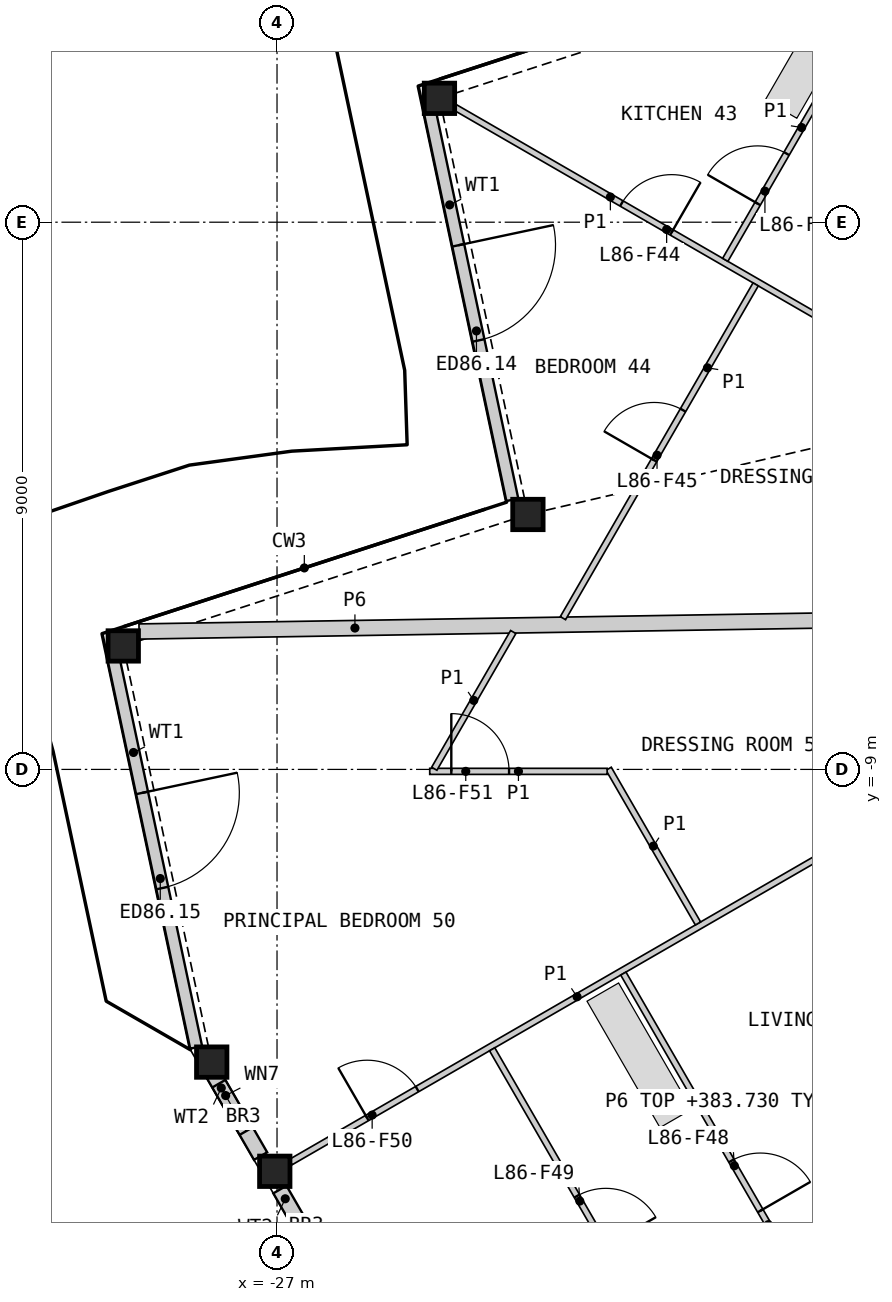
"""IFC4 building model, lengths in metres.
Left out: names, types, materials, properties, quantities, classifications, styles, units other than length and angle.
Written with IfcOpenShell. Run it as: python <this file> out.ifc"""

import sys

from ifc_helpers import new_model, si_unit, direction, frame, frame_2d, origin, origin_2d, place, context, subcontext, project, spatial, rectangle, hollow_rectangle, extrude, element, fill, save


model = new_model("IFC4")
c1 = context("Model", 3, precision=1e-05, world=origin(), true_north=direction((0.0, 1.0)))
c2 = subcontext(c1, "Body", "Model", "MODEL_VIEW")
j1 = project(units=[si_unit("LENGTHUNIT", "METRE"), si_unit("PLANEANGLEUNIT", "RADIAN")], contexts=[c1])
p1 = place(None, origin())
s1 = spatial("IfcSite", under=j1, at=p1, CompositionType="ELEMENT")
p2 = place(p1, origin())
s2 = spatial("IfcBuilding", under=s1, at=p2, CompositionType="ELEMENT")
p3 = place(p2, frame((0.0, 0.0, 381.4)))
s3 = spatial("IfcBuildingStorey", under=s2, at=p3, CompositionType="ELEMENT", Elevation=381.4)
for number, where, z_axis, x_axis in (
    (1, (-24.329, 2.037, 0.0), (0.0, 0.0, 1.0), (1.0, 0.0, 0.0)),
    (2, (-22.874, -4.807, 0.0), (0.0, 0.0, 1.0), (1.0, 0.0, 0.0)),
    (3, (-29.529, -6.969, 0.0), (0.0, 0.0, 1.0), (1.0, 0.0, 0.0)),
    (4, (-28.074, -13.814, 0.0), (0.0, 0.0, 1.0), (1.0, 0.0, 0.0)),
    (5, (-27.037, -15.61, 0.0), (0.0, 0.0, 1.0), (1.0, 0.0, 0.0)),
):
    element("IfcColumn", number, at=place(p3, frame(where, z_axis=z_axis, x_axis=x_axis)), inside=s3, PredefinedType="COLUMN", context=c2, shape_type="SweptSolid", body=[
        extrude(hollow_rectangle(XDim=0.5, YDim=0.5, WallThickness=0.03, at=origin_2d()), origin(), (0.0, 0.0, 1.0), 3.4),
    ])
p4 = place(p3, frame((-24.505, 1.902, 0.0), z_axis=(0.0, 0.0, 1.0), x_axis=(0.207917488951, -0.978146368285, 0.0)))
e6 = element("IfcWall", 6, at=p4, inside=s3, PredefinedType="SOLIDWALL", context=c2, shape_type="SweptSolid", body=[
    extrude(rectangle(XDim=6.612, YDim=0.2, at=frame_2d((3.306, 0.0))), origin(), (0.0, 0.0, 1.0), 2.634),
])
p5 = place(p4, frame((2.333, 0.0, 0.0)))
e7 = element("IfcOpeningElement", 7, at=p5, cuts=e6, PredefinedType="OPENING", context=c2, shape_type="SweptSolid", body=[
    extrude(rectangle(XDim=1.6, YDim=2.25, at=frame_2d((0.8, 1.125))), frame((0.0, 0.11, 0.0), z_axis=(0.0, -1.0, 0.0), x_axis=(1.0, 0.0, 0.0)), (0.0, 0.0, 1.0), 0.22),
])
p6 = place(p3, frame((-29.705, -7.105, 0.0), z_axis=(0.0, 0.0, 1.0), x_axis=(0.207924998532, -0.978144771997, 0.0)))
e8 = element("IfcWall", 8, at=p6, inside=s3, PredefinedType="SOLIDWALL", context=c2, shape_type="SweptSolid", body=[
    extrude(rectangle(XDim=6.612, YDim=0.2, at=frame_2d((3.306, 0.0))), origin(), (0.0, 0.0, 1.0), 2.634),
])
p7 = place(p6, frame((2.333, 0.0, 0.0)))
e9 = element("IfcOpeningElement", 9, at=p7, cuts=e8, PredefinedType="OPENING", context=c2, shape_type="SweptSolid", body=[
    extrude(rectangle(XDim=1.6, YDim=2.25, at=frame_2d((0.8, 1.125))), frame((0.0, 0.11, 0.0), z_axis=(0.0, -1.0, 0.0), x_axis=(1.0, 0.0, 0.0)), (0.0, 0.0, 1.0), 0.22),
])
p8 = place(p3, frame((-28.132, -13.866, 0.0), z_axis=(0.0, 0.0, 1.0), x_axis=(0.499975693202, -0.866039436866, 0.0)))
e10 = element("IfcWall", 10, at=p8, inside=s3, PredefinedType="SOLIDWALL", context=c2, shape_type="SweptSolid", body=[
    extrude(rectangle(XDim=1.725, YDim=0.25, at=frame_2d((0.862, 0.0))), origin(), (0.0, 0.0, 1.0), 2.634),
])
p9 = place(p8, frame((0.35, 0.0, 1.8)))
e11 = element("IfcOpeningElement", 11, at=p9, cuts=e10, PredefinedType="OPENING", context=c2, shape_type="SweptSolid", body=[
    extrude(rectangle(XDim=0.9, YDim=0.6, at=frame_2d((0.45, 0.3))), frame((0.0, 0.135, 0.0), z_axis=(0.0, -1.0, 0.0), x_axis=(1.0, 0.0, 0.0)), (0.0, 0.0, 1.0), 0.27),
])
p10 = place(p3, frame((-26.953, -15.91, 0.0), z_axis=(0.0, 0.0, 1.0), x_axis=(0.500027377864, -0.86600959659, 0.0)))
e12 = element("IfcWall", 12, at=p10, inside=s3, PredefinedType="SOLIDWALL", context=c2, shape_type="SweptSolid", body=[
    extrude(rectangle(XDim=1.756, YDim=0.25, at=frame_2d((0.878, 0.0))), origin(), (0.0, 0.0, 1.0), 2.634),
])
p11 = place(p3, frame((-20.338, -21.771, 0.0), z_axis=(0.0, 0.0, 1.0), x_axis=(0.513878217441, 0.857863146218, 0.0)))
e13 = element("IfcWall", 13, at=p11, inside=s3, PredefinedType="PARTITIONING", context=c2, shape_type="SweptSolid", body=[
    extrude(rectangle(XDim=13.956, YDim=0.25, at=frame_2d((6.978, 0.0))), origin(), (0.0, 0.0, 1.0), 2.33),
])
p12 = place(p3, frame((-29.269, -6.732, 0.0), z_axis=(0.0, 0.0, 1.0), x_axis=(0.999870533117, 0.016090898164, 0.0)))
e14 = element("IfcWall", 14, at=p12, inside=s3, PredefinedType="PARTITIONING", context=c2, shape_type="SweptSolid", body=[
    extrude(rectangle(XDim=14.202, YDim=0.25, at=frame_2d((7.101, 0.0))), origin(), (0.0, 0.0, 1.0), 2.33),
])
p13 = place(p3, frame((-24.069, 1.887, 0.0), z_axis=(0.0, 0.0, 1.0), x_axis=(0.866023404247, -0.500003463284, 0.0)))
e15 = element("IfcWall", 15, at=p13, inside=s3, PredefinedType="PARTITIONING", context=c2, shape_type="SweptSolid", body=[
    extrude(rectangle(XDim=11.782, YDim=0.1, at=frame_2d((5.891, 0.0))), origin(), (0.0, 0.0, 1.0), 2.33),
])
p14 = place(p13, frame((3.159, 0.0, 0.0)))
e16 = element("IfcOpeningElement", 16, at=p14, cuts=e15, PredefinedType="OPENING", context=c2, shape_type="SweptSolid", body=[
    extrude(rectangle(XDim=0.95, YDim=2.1, at=frame_2d((0.475, 1.05))), frame((0.0, 0.06, 0.0), z_axis=(0.0, -1.0, 0.0), x_axis=(1.0, 0.0, 0.0)), (0.0, 0.0, 1.0), 0.12),
])
p15 = place(p3, frame((-26.777, -15.46, 0.0), z_axis=(0.0, 0.0, 1.0), x_axis=(0.866019680922, 0.500009912158, 0.0)))
e17 = element("IfcWall", 17, at=p15, inside=s3, PredefinedType="PARTITIONING", context=c2, shape_type="SweptSolid", body=[
    extrude(rectangle(XDim=10.881, YDim=0.1, at=frame_2d((5.44, 0.0))), origin(), (0.0, 0.0, 1.0), 2.33),
])
p16 = place(p15, frame((1.454, 0.0, 0.0)))
e18 = element("IfcOpeningElement", 18, at=p16, cuts=e17, PredefinedType="OPENING", context=c2, shape_type="SweptSolid", body=[
    extrude(rectangle(XDim=0.95, YDim=2.1, at=frame_2d((0.475, 1.05))), frame((0.0, 0.06, 0.0), z_axis=(0.0, -1.0, 0.0), x_axis=(1.0, 0.0, 0.0)), (0.0, 0.0, 1.0), 0.12),
])
p17 = place(p3, frame((-23.462, -13.603, 0.0), z_axis=(0.0, 0.0, 1.0), x_axis=(0.499998111909, -0.866026493871, 0.0)))
e19 = element("IfcWall", 19, at=p17, inside=s3, PredefinedType="PARTITIONING", context=c2, shape_type="SweptSolid", body=[
    extrude(rectangle(XDim=7.743, YDim=0.1, at=frame_2d((3.872, 0.0))), origin(), (0.0, 0.0, 1.0), 2.33),
])
p18 = place(p17, frame((2.788, 0.0, 0.0)))
e20 = element("IfcOpeningElement", 20, at=p18, cuts=e19, PredefinedType="OPENING", context=c2, shape_type="SweptSolid", body=[
    extrude(rectangle(XDim=0.95, YDim=2.1, at=frame_2d((0.475, 1.05))), frame((0.0, 0.06, 0.0), z_axis=(0.0, -1.0, 0.0), x_axis=(1.0, 0.0, 0.0)), (0.0, 0.0, 1.0), 0.12),
])
p19 = place(p3, frame((-21.304, -12.358, 0.0), z_axis=(0.0, 0.0, 1.0), x_axis=(0.500000558108, -0.866025081561, 0.0)))
e21 = element("IfcWall", 21, at=p19, inside=s3, PredefinedType="PARTITIONING", context=c2, shape_type="SweptSolid", body=[
    extrude(rectangle(XDim=6.358, YDim=0.1, at=frame_2d((3.179, 0.0))), origin(), (0.0, 0.0, 1.0), 2.33),
])
p20 = place(p19, frame((3.555, 0.0, 0.0)))
e22 = element("IfcOpeningElement", 22, at=p20, cuts=e21, PredefinedType="OPENING", context=c2, shape_type="SweptSolid", body=[
    extrude(rectangle(XDim=0.95, YDim=2.1, at=frame_2d((0.475, 1.05))), frame((0.0, 0.06, 0.0), z_axis=(0.0, -1.0, 0.0), x_axis=(1.0, 0.0, 0.0)), (0.0, 0.0, 1.0), 0.12),
])
p21 = place(p3, frame((-22.298, -6.512, 0.0), z_axis=(0.0, 0.0, 1.0), x_axis=(0.499991387631, 0.866030376081, 0.0)))
e23 = element("IfcWall", 23, at=p21, inside=s3, PredefinedType="PARTITIONING", context=c2, shape_type="SweptSolid", body=[
    extrude(rectangle(XDim=6.339, YDim=0.1, at=frame_2d((3.169, 0.0))), origin(), (0.0, 0.0, 1.0), 2.33),
])
p22 = place(p21, frame((3.0, 0.0, 0.0)))
e24 = element("IfcOpeningElement", 24, at=p22, cuts=e23, PredefinedType="OPENING", context=c2, shape_type="SweptSolid", body=[
    extrude(rectangle(XDim=0.95, YDim=2.1, at=frame_2d((0.475, 1.05))), frame((0.0, 0.06, 0.0), z_axis=(0.0, -1.0, 0.0), x_axis=(1.0, 0.0, 0.0)), (0.0, 0.0, 1.0), 0.12),
])
p23 = place(p3, frame((-19.628, -0.619, 0.0), z_axis=(0.0, 0.0, 1.0), x_axis=(0.499990214365, 0.86603105345, 0.0)))
e25 = element("IfcWall", 25, at=p23, inside=s3, PredefinedType="PARTITIONING", context=c2, shape_type="SweptSolid", body=[
    extrude(rectangle(XDim=5.025, YDim=0.1, at=frame_2d((2.512, 0.0))), origin(), (0.0, 0.0, 1.0), 2.33),
])
p24 = place(p23, frame((1.067, 0.0, 0.0)))
e26 = element("IfcOpeningElement", 26, at=p24, cuts=e25, PredefinedType="OPENING", context=c2, shape_type="SweptSolid", body=[
    extrude(rectangle(XDim=0.95, YDim=2.1, at=frame_2d((0.475, 1.05))), frame((0.0, 0.06, 0.0), z_axis=(0.0, -1.0, 0.0), x_axis=(1.0, 0.0, 0.0)), (0.0, 0.0, 1.0), 0.12),
])
p25 = place(p3, frame((-21.546, -8.989, 0.0), z_axis=(0.0, 0.0, 1.0), x_axis=(0.499919039967, -0.866072141036, 0.0)))
e27 = element("IfcWall", 27, at=p25, inside=s3, PredefinedType="PARTITIONING", context=c2, shape_type="SweptSolid", body=[
    extrude(rectangle(XDim=2.938, YDim=0.1, at=frame_2d((1.469, 0.0))), origin(), (0.0, 0.0, 1.0), 2.33),
])
p26 = place(p3, frame((-24.489, -9.032, 0.0), z_axis=(0.0, 0.0, 1.0), x_axis=(1.0, 0.0, 0.0)))
e28 = element("IfcWall", 28, at=p26, inside=s3, PredefinedType="PARTITIONING", context=c2, shape_type="SweptSolid", body=[
    extrude(rectangle(XDim=2.917, YDim=0.1, at=frame_2d((1.459, 0.0))), origin(), (0.0, 0.0, 1.0), 2.33),
])
p27 = place(p26, frame((0.355, 0.0, 0.0)))
e29 = element("IfcOpeningElement", 29, at=p27, cuts=e28, PredefinedType="OPENING", context=c2, shape_type="SweptSolid", body=[
    extrude(rectangle(XDim=0.95, YDim=2.1, at=frame_2d((0.475, 1.05))), frame((0.0, 0.06, 0.0), z_axis=(0.0, -1.0, 0.0), x_axis=(1.0, 0.0, 0.0)), (0.0, 0.0, 1.0), 0.12),
])
p28 = place(p3, frame((-24.414, -8.989, 0.0), z_axis=(0.0, 0.0, 1.0), x_axis=(0.500042595688, 0.866000809756, 0.0)))
e30 = element("IfcWall", 30, at=p28, inside=s3, PredefinedType="PARTITIONING", context=c2, shape_type="SweptSolid", body=[
    extrude(rectangle(XDim=2.596, YDim=0.1, at=frame_2d((1.298, 0.0))), origin(), (0.0, 0.0, 1.0), 2.33),
])
p29 = place(p5, origin())
e31 = element("IfcDoor", 31, at=p29, inside=s3, OperationType="DOUBLE_DOOR_SINGLE_SWING", PredefinedType="DOOR", context=c2, shape_type="SweptSolid", body=[
    extrude(rectangle(XDim=1.6, YDim=2.25, at=frame_2d((0.8, 1.125))), frame((0.0, 0.025, 0.0), z_axis=(0.0, -1.0, 0.0), x_axis=(1.0, 0.0, 0.0)), (0.0, 0.0, 1.0), 0.05),
])
fill(e7, e31)
p30 = place(p7, origin())
e32 = element("IfcDoor", 32, at=p30, inside=s3, OperationType="DOUBLE_DOOR_SINGLE_SWING", PredefinedType="DOOR", context=c2, shape_type="SweptSolid", body=[
    extrude(rectangle(XDim=1.6, YDim=2.25, at=frame_2d((0.8, 1.125))), frame((0.0, 0.025, 0.0), z_axis=(0.0, -1.0, 0.0), x_axis=(1.0, 0.0, 0.0)), (0.0, 0.0, 1.0), 0.05),
])
fill(e9, e32)
p31 = place(p9, origin())
e33 = element("IfcWindow", 33, at=p31, inside=s3, PartitioningType="SINGLE_PANEL", PredefinedType="WINDOW", context=c2, shape_type="SweptSolid", body=[
    extrude(rectangle(XDim=0.9, YDim=0.6, at=frame_2d((0.45, 0.3))), frame((0.0, 0.03, 0.0), z_axis=(0.0, -1.0, 0.0), x_axis=(1.0, 0.0, 0.0)), (0.0, 0.0, 1.0), 0.06),
])
fill(e11, e33)
p32 = place(p24, origin())
e34 = element("IfcDoor", 34, at=p32, inside=s3, OperationType="SINGLE_SWING_LEFT", PredefinedType="DOOR", context=c2, shape_type="SweptSolid", body=[
    extrude(rectangle(XDim=0.95, YDim=2.1, at=frame_2d((0.475, 1.05))), frame((0.0, 0.025, 0.0), z_axis=(0.0, -1.0, 0.0), x_axis=(1.0, 0.0, 0.0)), (0.0, 0.0, 1.0), 0.05),
])
fill(e26, e34)
p33 = place(p14, origin())
e35 = element("IfcDoor", 35, at=p33, inside=s3, OperationType="SINGLE_SWING_RIGHT", PredefinedType="DOOR", context=c2, shape_type="SweptSolid", body=[
    extrude(rectangle(XDim=0.95, YDim=2.1, at=frame_2d((0.475, 1.05))), frame((0.0, 0.025, 0.0), z_axis=(0.0, -1.0, 0.0), x_axis=(1.0, 0.0, 0.0)), (0.0, 0.0, 1.0), 0.05),
])
fill(e16, e35)
p34 = place(p22, origin())
e36 = element("IfcDoor", 36, at=p34, inside=s3, OperationType="SINGLE_SWING_LEFT", PredefinedType="DOOR", context=c2, shape_type="SweptSolid", body=[
    extrude(rectangle(XDim=0.95, YDim=2.1, at=frame_2d((0.475, 1.05))), frame((0.0, 0.025, 0.0), z_axis=(0.0, -1.0, 0.0), x_axis=(1.0, 0.0, 0.0)), (0.0, 0.0, 1.0), 0.05),
])
fill(e24, e36)
p35 = place(p20, origin())
e37 = element("IfcDoor", 37, at=p35, inside=s3, OperationType="SINGLE_SWING_RIGHT", PredefinedType="DOOR", context=c2, shape_type="SweptSolid", body=[
    extrude(rectangle(XDim=0.95, YDim=2.1, at=frame_2d((0.475, 1.05))), frame((0.0, 0.025, 0.0), z_axis=(0.0, -1.0, 0.0), x_axis=(1.0, 0.0, 0.0)), (0.0, 0.0, 1.0), 0.05),
])
fill(e22, e37)
p36 = place(p18, origin())
e38 = element("IfcDoor", 38, at=p36, inside=s3, OperationType="SINGLE_SWING_RIGHT", PredefinedType="DOOR", context=c2, shape_type="SweptSolid", body=[
    extrude(rectangle(XDim=0.95, YDim=2.1, at=frame_2d((0.475, 1.05))), frame((0.0, 0.025, 0.0), z_axis=(0.0, -1.0, 0.0), x_axis=(1.0, 0.0, 0.0)), (0.0, 0.0, 1.0), 0.05),
])
fill(e20, e38)
p37 = place(p16, origin())
e39 = element("IfcDoor", 39, at=p37, inside=s3, OperationType="SINGLE_SWING_LEFT", PredefinedType="DOOR", context=c2, shape_type="SweptSolid", body=[
    extrude(rectangle(XDim=0.95, YDim=2.1, at=frame_2d((0.475, 1.05))), frame((0.0, 0.025, 0.0), z_axis=(0.0, -1.0, 0.0), x_axis=(1.0, 0.0, 0.0)), (0.0, 0.0, 1.0), 0.05),
])
fill(e18, e39)
p38 = place(p27, origin())
e40 = element("IfcDoor", 40, at=p38, inside=s3, OperationType="SINGLE_SWING_LEFT", PredefinedType="DOOR", context=c2, shape_type="SweptSolid", body=[
    extrude(rectangle(XDim=0.95, YDim=2.1, at=frame_2d((0.475, 1.05))), frame((0.0, 0.025, 0.0), z_axis=(0.0, -1.0, 0.0), x_axis=(1.0, 0.0, 0.0)), (0.0, 0.0, 1.0), 0.05),
])
fill(e29, e40)
save(model, sys.argv[1])
